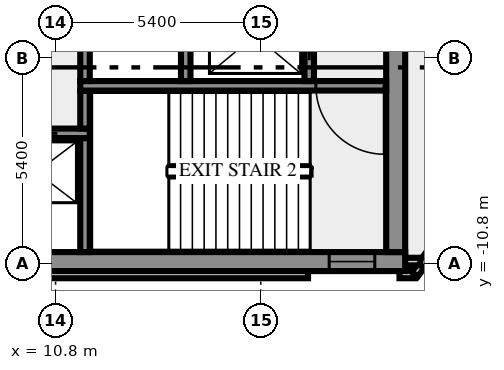
"""IFC4 building model, lengths in metres.
Left out: names, types, materials, properties, quantities, classifications, styles, units other than length and angle.
Written with IfcOpenShell. Run it as: python <this file> out.ifc"""

import sys

from ifc_helpers import new_model, si_unit, direction, frame, frame_2d, origin, place, context, subcontext, project, spatial, rectangle, extrude, element, fill, save


model = new_model("IFC4")
c1 = context("Model", 3, precision=1e-05, world=origin(), true_north=direction((0.0, 1.0)))
c2 = subcontext(c1, "Body", "Model", "MODEL_VIEW")
j1 = project(units=[si_unit("LENGTHUNIT", "METRE"), si_unit("PLANEANGLEUNIT", "RADIAN")], contexts=[c1])
p1 = place(None, origin())
s1 = spatial("IfcSite", under=j1, at=p1, CompositionType="ELEMENT")
p2 = place(p1, origin())
s2 = spatial("IfcBuilding", under=s1, at=p2, CompositionType="ELEMENT")
p3 = place(p2, frame((0.0, 0.0, 144.0)))
s3 = spatial("IfcBuildingStorey", under=s2, at=p3, CompositionType="ELEMENT", Elevation=144.0)
p4 = place(p3, frame((-17.444, -11.088, 0.0), z_axis=(0.0, 0.0, 1.0), x_axis=(1.0, 0.0, 0.0)))
e1 = element("IfcWall", 1, at=p4, inside=s3, PredefinedType="SOLIDWALL", context=c2, shape_type="SweptSolid", body=[
    extrude(rectangle(XDim=34.888, YDim=0.2, at=frame_2d((17.444, 0.0))), origin(), (0.0, 0.0, 1.0), 3.65),
])
p5 = place(p3, frame((19.85, -11.088, 0.0), z_axis=(0.0, 0.0, 1.0), x_axis=(1.0, 0.0, 0.0)))
e2 = element("IfcWall", 2, at=p5, inside=s3, PredefinedType="SOLIDWALL", context=c2, shape_type="SweptSolid", body=[
    extrude(rectangle(XDim=0.406, YDim=0.2, at=frame_2d((0.203, 0.0))), origin(), (0.0, 0.0, 1.0), 3.65),
])
p6 = place(p3, frame((20.253, -11.083, 0.0), z_axis=(0.0, 0.0, 1.0), x_axis=(0.587766567315, 0.809030569476, 0.0)))
e3 = element("IfcWall", 3, at=p6, inside=s3, PredefinedType="SOLIDWALL", context=c2, shape_type="SweptSolid", body=[
    extrude(rectangle(XDim=2.688, YDim=0.2, at=frame_2d((1.344, 0.0))), origin(), (0.0, 0.0, 1.0), 3.65),
])
p7 = place(p3, frame((19.98, -10.75, 0.0), z_axis=(0.0, 0.0, 1.0), x_axis=(1.0, 0.0, 0.0)))
e4 = element("IfcWall", 4, at=p7, inside=s3, PredefinedType="SOLIDWALL", context=c2, shape_type="SweptSolid", body=[
    extrude(rectangle(XDim=0.417, YDim=0.2, at=frame_2d((0.208, 0.0))), origin(), (0.0, 0.0, 1.0), 3.65),
])
p8 = place(p3, frame((-20.0, -10.75, 0.0), z_axis=(0.0, 0.0, 1.0), x_axis=(1.0, 0.0, 0.0)))
e5 = element("IfcWall", 5, at=p8, inside=s3, PredefinedType="SHEAR", context=c2, shape_type="SweptSolid", body=[
    extrude(rectangle(XDim=40.0, YDim=0.5, at=frame_2d((20.0, 0.0))), origin(), (0.0, 0.0, 1.0), 3.65),
])
p9 = place(p8, frame((0.8, 0.0, 1.0)))
e6 = element("IfcOpeningElement", 6, at=p9, cuts=e5, PredefinedType="OPENING", context=c2, shape_type="SweptSolid", body=[
    extrude(rectangle(XDim=1.2, YDim=1.2, at=frame_2d((0.6, 0.6))), frame((0.0, 0.26, 0.0), z_axis=(0.0, -1.0, 0.0), x_axis=(1.0, 0.0, 0.0)), (0.0, 0.0, 1.0), 0.52),
])
p10 = place(p8, frame((38.0, 0.0, 1.0)))
e7 = element("IfcOpeningElement", 7, at=p10, cuts=e5, PredefinedType="OPENING", context=c2, shape_type="SweptSolid", body=[
    extrude(rectangle(XDim=1.2, YDim=1.2, at=frame_2d((0.6, 0.6))), frame((0.0, 0.26, 0.0), z_axis=(0.0, -1.0, 0.0), x_axis=(1.0, 0.0, 0.0)), (0.0, 0.0, 1.0), 0.52),
])
p11 = place(p3, frame((11.575, -10.5, 0.0), z_axis=(0.0, 0.0, 1.0), x_axis=(0.0, 1.0, 0.0)))
e8 = element("IfcWall", 8, at=p11, inside=s3, PredefinedType="SHEAR", context=c2, shape_type="SweptSolid", body=[
    extrude(rectangle(XDim=3.0, YDim=0.25, at=frame_2d((1.5, 0.0))), origin(), (0.0, 0.0, 1.0), 3.65),
])
p12 = place(p3, frame((19.75, -10.5, 0.0), z_axis=(0.0, 0.0, 1.0), x_axis=(0.0, 1.0, 0.0)))
e9 = element("IfcWall", 9, at=p12, inside=s3, PredefinedType="SHEAR", context=c2, shape_type="SweptSolid", body=[
    extrude(rectangle(XDim=8.8, YDim=0.5, at=frame_2d((4.4, 0.0))), origin(), (0.0, 0.0, 1.0), 3.65),
])
p13 = place(p3, frame((11.7, -7.375, 0.0), z_axis=(0.0, 0.0, 1.0), x_axis=(-1.0, 0.0, 0.0)))
e10 = element("IfcWall", 10, at=p13, inside=s3, PredefinedType="SHEAR", context=c2, shape_type="SweptSolid", body=[
    extrude(rectangle(XDim=23.4, YDim=0.25, at=frame_2d((11.7, 0.0))), origin(), (0.0, 0.0, 1.0), 3.65),
])
p14 = place(p13, frame((21.812, 0.0, 0.0)))
e11 = element("IfcOpeningElement", 11, at=p14, cuts=e10, PredefinedType="OPENING", context=c2, shape_type="SweptSolid", body=[
    extrude(rectangle(XDim=0.9, YDim=2.1, at=frame_2d((0.45, 1.05))), frame((0.0, 0.135, 0.0), z_axis=(0.0, -1.0, 0.0), x_axis=(1.0, 0.0, 0.0)), (0.0, 0.0, 1.0), 0.27),
])
p15 = place(p13, frame((19.55, 0.0, 0.0)))
e12 = element("IfcOpeningElement", 12, at=p15, cuts=e10, PredefinedType="OPENING", context=c2, shape_type="SweptSolid", body=[
    extrude(rectangle(XDim=0.9, YDim=2.1, at=frame_2d((0.45, 1.05))), frame((0.0, 0.135, 0.0), z_axis=(0.0, -1.0, 0.0), x_axis=(1.0, 0.0, 0.0)), (0.0, 0.0, 1.0), 0.27),
])
p16 = place(p13, frame((16.787, 0.0, 0.0)))
e13 = element("IfcOpeningElement", 13, at=p16, cuts=e10, PredefinedType="OPENING", context=c2, shape_type="SweptSolid", body=[
    extrude(rectangle(XDim=0.9, YDim=2.1, at=frame_2d((0.45, 1.05))), frame((0.0, 0.135, 0.0), z_axis=(0.0, -1.0, 0.0), x_axis=(1.0, 0.0, 0.0)), (0.0, 0.0, 1.0), 0.27),
])
p17 = place(p13, frame((14.55, 0.0, 0.0)))
e14 = element("IfcOpeningElement", 14, at=p17, cuts=e10, PredefinedType="OPENING", context=c2, shape_type="SweptSolid", body=[
    extrude(rectangle(XDim=0.8, YDim=2.1, at=frame_2d((0.4, 1.05))), frame((0.0, 0.135, 0.0), z_axis=(0.0, -1.0, 0.0), x_axis=(1.0, 0.0, 0.0)), (0.0, 0.0, 1.0), 0.27),
])
p18 = place(p13, frame((12.8, 0.0, 0.0)))
e15 = element("IfcOpeningElement", 15, at=p18, cuts=e10, PredefinedType="OPENING", context=c2, shape_type="SweptSolid", body=[
    extrude(rectangle(XDim=0.9, YDim=2.1, at=frame_2d((0.45, 1.05))), frame((0.0, 0.135, 0.0), z_axis=(0.0, -1.0, 0.0), x_axis=(1.0, 0.0, 0.0)), (0.0, 0.0, 1.0), 0.27),
])
p19 = place(p13, frame((10.7, 0.0, 0.0)))
e16 = element("IfcOpeningElement", 16, at=p19, cuts=e10, PredefinedType="OPENING", context=c2, shape_type="SweptSolid", body=[
    extrude(rectangle(XDim=0.9, YDim=2.1, at=frame_2d((0.45, 1.05))), frame((0.0, 0.135, 0.0), z_axis=(0.0, -1.0, 0.0), x_axis=(1.0, 0.0, 0.0)), (0.0, 0.0, 1.0), 0.27),
])
p20 = place(p13, frame((8.35, 0.0, 0.0)))
e17 = element("IfcOpeningElement", 17, at=p20, cuts=e10, PredefinedType="OPENING", context=c2, shape_type="SweptSolid", body=[
    extrude(rectangle(XDim=1.1, YDim=2.1, at=frame_2d((0.55, 1.05))), frame((0.0, 0.135, 0.0), z_axis=(0.0, -1.0, 0.0), x_axis=(1.0, 0.0, 0.0)), (0.0, 0.0, 1.0), 0.27),
])
p21 = place(p13, frame((5.85, 0.0, 0.0)))
e18 = element("IfcOpeningElement", 18, at=p21, cuts=e10, PredefinedType="OPENING", context=c2, shape_type="SweptSolid", body=[
    extrude(rectangle(XDim=1.1, YDim=2.1, at=frame_2d((0.55, 1.05))), frame((0.0, 0.135, 0.0), z_axis=(0.0, -1.0, 0.0), x_axis=(1.0, 0.0, 0.0)), (0.0, 0.0, 1.0), 0.27),
])
p22 = place(p13, frame((3.35, 0.0, 0.0)))
e19 = element("IfcOpeningElement", 19, at=p22, cuts=e10, PredefinedType="OPENING", context=c2, shape_type="SweptSolid", body=[
    extrude(rectangle(XDim=1.1, YDim=2.1, at=frame_2d((0.55, 1.05))), frame((0.0, 0.135, 0.0), z_axis=(0.0, -1.0, 0.0), x_axis=(1.0, 0.0, 0.0)), (0.0, 0.0, 1.0), 0.27),
])
p23 = place(p13, frame((0.85, 0.0, 0.0)))
e20 = element("IfcOpeningElement", 20, at=p23, cuts=e10, PredefinedType="OPENING", context=c2, shape_type="SweptSolid", body=[
    extrude(rectangle(XDim=1.1, YDim=2.1, at=frame_2d((0.55, 1.05))), frame((0.0, 0.135, 0.0), z_axis=(0.0, -1.0, 0.0), x_axis=(1.0, 0.0, 0.0)), (0.0, 0.0, 1.0), 0.27),
])
p24 = place(p3, frame((11.575, -7.25, 0.0), z_axis=(0.0, 0.0, 1.0), x_axis=(0.0, 1.0, 0.0)))
e21 = element("IfcWall", 21, at=p24, inside=s3, PredefinedType="SHEAR", context=c2, shape_type="SweptSolid", body=[
    extrude(rectangle(XDim=1.0, YDim=0.25, at=frame_2d((0.5, 0.0))), origin(), (0.0, 0.0, 1.0), 3.65),
])
p25 = place(p3, frame((19.5, -6.125, 0.0), z_axis=(0.0, 0.0, 1.0), x_axis=(-1.0, 0.0, 0.0)))
e22 = element("IfcWall", 22, at=p25, inside=s3, PredefinedType="SHEAR", context=c2, shape_type="SweptSolid", body=[
    extrude(rectangle(XDim=8.05, YDim=0.25, at=frame_2d((4.025, 0.0))), origin(), (0.0, 0.0, 1.0), 3.65),
])
p26 = place(p25, frame((0.05, 0.0, 0.0)))
e23 = element("IfcOpeningElement", 23, at=p26, cuts=e22, PredefinedType="OPENING", context=c2, shape_type="SweptSolid", body=[
    extrude(rectangle(XDim=1.8, YDim=2.1, at=frame_2d((0.9, 1.05))), frame((0.0, 0.135, 0.0), z_axis=(0.0, -1.0, 0.0), x_axis=(1.0, 0.0, 0.0)), (0.0, 0.0, 1.0), 0.27),
])
p27 = place(p3, frame((11.575, -6.0, 0.0), z_axis=(0.0, 0.0, 1.0), x_axis=(0.0, 1.0, 0.0)))
e24 = element("IfcWall", 24, at=p27, inside=s3, PredefinedType="SHEAR", context=c2, shape_type="SweptSolid", body=[
    extrude(rectangle(XDim=1.75, YDim=0.25, at=frame_2d((0.875, 0.0))), origin(), (0.0, 0.0, 1.0), 3.65),
])
p28 = place(p3, frame((14.225, -6.0, 0.0), z_axis=(0.0, 0.0, 1.0), x_axis=(0.0, 1.0, 0.0)))
e25 = element("IfcWall", 25, at=p28, inside=s3, PredefinedType="SHEAR", context=c2, shape_type="SweptSolid", body=[
    extrude(rectangle(XDim=4.3, YDim=0.25, at=frame_2d((2.15, 0.0))), origin(), (0.0, 0.0, 1.0), 3.65),
])
p29 = place(p3, frame((17.475, -6.0, 0.0), z_axis=(0.0, 0.0, 1.0), x_axis=(0.0, 1.0, 0.0)))
e26 = element("IfcWall", 26, at=p29, inside=s3, PredefinedType="SHEAR", context=c2, shape_type="SweptSolid", body=[
    extrude(rectangle(XDim=4.3, YDim=0.25, at=frame_2d((2.15, 0.0))), origin(), (0.0, 0.0, 1.0), 3.65),
])
p30 = place(p29, frame((0.55, 0.0, 0.0)))
e27 = element("IfcOpeningElement", 27, at=p30, cuts=e26, PredefinedType="OPENING", context=c2, shape_type="SweptSolid", body=[
    extrude(rectangle(XDim=1.3, YDim=2.1, at=frame_2d((0.65, 1.05))), frame((0.0, 0.135, 0.0), z_axis=(0.0, -1.0, 0.0), x_axis=(1.0, 0.0, 0.0)), (0.0, 0.0, 1.0), 0.27),
])
p31 = place(p10, origin())
e28 = element("IfcWindow", 28, at=p31, inside=s3, PartitioningType="SINGLE_PANEL", PredefinedType="WINDOW", context=c2, shape_type="SweptSolid", body=[
    extrude(rectangle(XDim=1.2, YDim=1.2, at=frame_2d((0.6, 0.6))), frame((0.0, 0.03, 0.0), z_axis=(0.0, -1.0, 0.0), x_axis=(1.0, 0.0, 0.0)), (0.0, 0.0, 1.0), 0.06),
])
fill(e7, e28)
p32 = place(p23, origin())
e29 = element("IfcDoor", 29, at=p32, inside=s3, OperationType="DOUBLE_DOOR_SLIDING", PredefinedType="DOOR", context=c2, shape_type="SweptSolid", body=[
    extrude(rectangle(XDim=1.1, YDim=2.1, at=frame_2d((0.55, 1.05))), frame((0.0, 0.025, 0.0), z_axis=(0.0, -1.0, 0.0), x_axis=(1.0, 0.0, 0.0)), (0.0, 0.0, 1.0), 0.05),
])
fill(e20, e29)
p33 = place(p26, origin())
e30 = element("IfcDoor", 30, at=p33, inside=s3, OperationType="DOUBLE_DOOR_SINGLE_SWING", PredefinedType="DOOR", context=c2, shape_type="SweptSolid", body=[
    extrude(rectangle(XDim=1.8, YDim=2.1, at=frame_2d((0.9, 1.05))), frame((0.0, 0.025, 0.0), z_axis=(0.0, -1.0, 0.0), x_axis=(1.0, 0.0, 0.0)), (0.0, 0.0, 1.0), 0.05),
])
fill(e23, e30)
p34 = place(p30, origin())
e31 = element("IfcDoor", 31, at=p34, inside=s3, OperationType="DOUBLE_DOOR_SLIDING", PredefinedType="DOOR", context=c2, shape_type="SweptSolid", body=[
    extrude(rectangle(XDim=1.3, YDim=2.1, at=frame_2d((0.65, 1.05))), frame((0.0, 0.025, 0.0), z_axis=(0.0, -1.0, 0.0), x_axis=(1.0, 0.0, 0.0)), (0.0, 0.0, 1.0), 0.05),
])
fill(e27, e31)
save(model, sys.argv[1])
